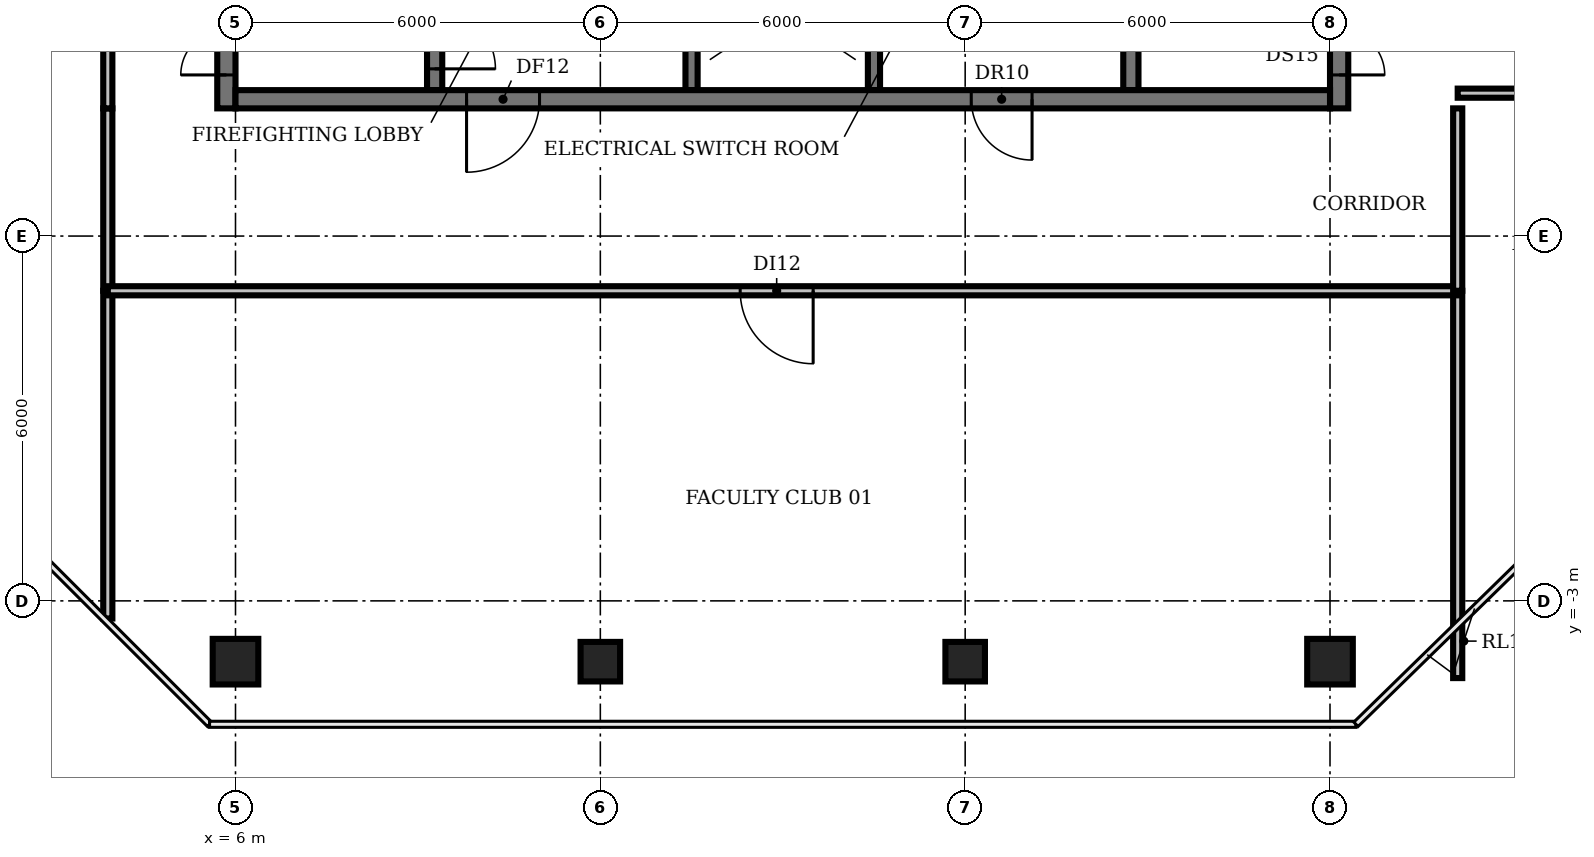
"""IFC4 building model, lengths in metres.
Left out: names, types, materials, properties, quantities, classifications, styles, units other than length and angle.
Written with IfcOpenShell. Run it as: python <this file> out.ifc"""

import sys

from ifc_helpers import new_model, si_unit, direction, frame, frame_2d, origin, origin_2d, place, context, subcontext, project, spatial, rectangle, circle, extrude, element, fill, save


model = new_model("IFC4")
c1 = context("Model", 3, precision=1e-05, world=origin(), true_north=direction((0.0, 1.0)))
c2 = subcontext(c1, "Body", "Model", "MODEL_VIEW")
j1 = project(units=[si_unit("LENGTHUNIT", "METRE"), si_unit("PLANEANGLEUNIT", "RADIAN")], contexts=[c1])
p1 = place(None, origin())
s1 = spatial("IfcSite", under=j1, at=p1, CompositionType="ELEMENT")
p2 = place(p1, origin())
s2 = spatial("IfcBuilding", under=s1, at=p2, CompositionType="ELEMENT")
p3 = place(p2, frame((0.0, 0.0, 318.8)))
s3 = spatial("IfcBuildingStorey", under=s2, at=p3, CompositionType="ELEMENT", Elevation=318.8)
p4 = place(p3, frame((6.0, -4.0, 0.0), z_axis=(0.0, 0.0, 1.0), x_axis=(1.0, 0.0, 0.0)))
e1 = element("IfcColumn", 1, at=p4, inside=s3, PredefinedType="COLUMN", context=c2, shape_type="SweptSolid", body=[
    extrude(circle(Radius=0.375, at=origin_2d()), origin(), (0.0, 0.0, 1.0), 3.9),
])
for number, where, z_axis, x_axis in (
    (2, (12.0, -4.0, 0.0), (0.0, 0.0, 1.0), (1.0, 0.0, 0.0)),
    (3, (18.0, -4.0, 0.0), (0.0, 0.0, 1.0), (1.0, 0.0, 0.0)),
):
    element("IfcColumn", number, at=place(p3, frame(where, z_axis=z_axis, x_axis=x_axis)), inside=s3, PredefinedType="COLUMN", context=c2, shape_type="SweptSolid", body=[
        extrude(rectangle(XDim=0.65, YDim=0.65, at=origin_2d()), origin(), (0.0, 0.0, 1.0), 3.9),
    ])
p5 = place(p3, frame((24.0, -4.0, 0.0), z_axis=(0.0, 0.0, 1.0), x_axis=(1.0, 0.0, 0.0)))
e4 = element("IfcColumn", 4, at=p5, inside=s3, PredefinedType="COLUMN", context=c2, shape_type="SweptSolid", body=[
    extrude(circle(Radius=0.375, at=origin_2d()), origin(), (0.0, 0.0, 1.0), 3.9),
])
p6 = place(p3, frame((9.275, 11.825, 0.0), z_axis=(0.0, 0.0, 1.0), x_axis=(0.0, -1.0, 0.0)))
e5 = element("IfcWall", 5, at=p6, inside=s3, PredefinedType="SHEAR", context=c2, shape_type="SweptSolid", body=[
    extrude(rectangle(XDim=6.425, YDim=0.25, at=frame_2d((3.212, 0.0))), origin(), (0.0, 0.0, 1.0), 3.9),
])
p7 = place(p6, frame((5.075, 0.0, 0.0)))
e6 = element("IfcOpeningElement", 6, at=p7, cuts=e5, PredefinedType="OPENING", context=c2, shape_type="SweptSolid", body=[
    extrude(rectangle(XDim=1.0, YDim=2.1, at=frame_2d((0.5, 1.05))), frame((0.0, 0.135, 0.0), z_axis=(0.0, -1.0, 0.0), x_axis=(1.0, 0.0, 0.0)), (0.0, 0.0, 1.0), 0.27),
])
p8 = place(p3, frame((13.5, 5.4, 0.0), z_axis=(0.0, 0.0, 1.0), x_axis=(0.0, 1.0, 0.0)))
e7 = element("IfcWall", 7, at=p8, inside=s3, PredefinedType="SHEAR", context=c2, shape_type="SweptSolid", body=[
    extrude(rectangle(XDim=8.2, YDim=0.2, at=frame_2d((4.1, 0.0))), origin(), (0.0, 0.0, 1.0), 3.9),
])
p9 = place(p8, frame((0.75, 0.0, 0.0)))
e8 = element("IfcOpeningElement", 8, at=p9, cuts=e7, PredefinedType="OPENING", context=c2, shape_type="SweptSolid", body=[
    extrude(rectangle(XDim=1.1, YDim=2.1, at=frame_2d((0.55, 1.05))), frame((0.0, 0.11, 0.0), z_axis=(0.0, -1.0, 0.0), x_axis=(1.0, 0.0, 0.0)), (0.0, 0.0, 1.0), 0.22),
])
p10 = place(p8, frame((3.55, 0.0, 0.0)))
e9 = element("IfcOpeningElement", 9, at=p10, cuts=e7, PredefinedType="OPENING", context=c2, shape_type="SweptSolid", body=[
    extrude(rectangle(XDim=1.1, YDim=2.1, at=frame_2d((0.55, 1.05))), frame((0.0, 0.11, 0.0), z_axis=(0.0, -1.0, 0.0), x_axis=(1.0, 0.0, 0.0)), (0.0, 0.0, 1.0), 0.22),
])
p11 = place(p8, frame((6.35, 0.0, 0.0)))
e10 = element("IfcOpeningElement", 10, at=p11, cuts=e7, PredefinedType="OPENING", context=c2, shape_type="SweptSolid", body=[
    extrude(rectangle(XDim=1.1, YDim=2.1, at=frame_2d((0.55, 1.05))), frame((0.0, 0.11, 0.0), z_axis=(0.0, -1.0, 0.0), x_axis=(1.0, 0.0, 0.0)), (0.0, 0.0, 1.0), 0.22),
])
p12 = place(p3, frame((16.5, 5.4, 0.0), z_axis=(0.0, 0.0, 1.0), x_axis=(0.0, 1.0, 0.0)))
e11 = element("IfcWall", 11, at=p12, inside=s3, PredefinedType="SHEAR", context=c2, shape_type="SweptSolid", body=[
    extrude(rectangle(XDim=8.2, YDim=0.2, at=frame_2d((4.1, 0.0))), origin(), (0.0, 0.0, 1.0), 3.9),
])
p13 = place(p3, frame((20.725, 5.4, 0.0), z_axis=(0.0, 0.0, 1.0), x_axis=(0.0, 1.0, 0.0)))
e12 = element("IfcWall", 12, at=p13, inside=s3, PredefinedType="SHEAR", context=c2, shape_type="SweptSolid", body=[
    extrude(rectangle(XDim=8.2, YDim=0.25, at=frame_2d((4.1, 0.0))), origin(), (0.0, 0.0, 1.0), 3.9),
])
p14 = place(p3, frame((5.85, 5.1, 0.0), z_axis=(0.0, 0.0, 1.0), x_axis=(0.0, 1.0, 0.0)))
e13 = element("IfcWall", 13, at=p14, inside=s3, PredefinedType="SHEAR", context=c2, shape_type="SweptSolid", body=[
    extrude(rectangle(XDim=20.0, YDim=0.3, at=frame_2d((10.0, 0.0))), origin(), (0.0, 0.0, 1.0), 3.9),
])
p15 = place(p14, frame((0.55, 0.0, 0.0)))
e14 = element("IfcOpeningElement", 14, at=p15, cuts=e13, PredefinedType="OPENING", context=c2, shape_type="SweptSolid", body=[
    extrude(rectangle(XDim=1.5, YDim=2.1, at=frame_2d((0.75, 1.05))), frame((0.0, 0.16, 0.0), z_axis=(0.0, -1.0, 0.0), x_axis=(1.0, 0.0, 0.0)), (0.0, 0.0, 1.0), 0.32),
])
p16 = place(p14, frame((7.0, 0.0, 0.0)))
e15 = element("IfcOpeningElement", 15, at=p16, cuts=e13, PredefinedType="OPENING", context=c2, shape_type="SweptSolid", body=[
    extrude(rectangle(XDim=1.2, YDim=2.1, at=frame_2d((0.6, 1.05))), frame((0.0, 0.16, 0.0), z_axis=(0.0, -1.0, 0.0), x_axis=(1.0, 0.0, 0.0)), (0.0, 0.0, 1.0), 0.32),
])
p17 = place(p14, frame((13.55, 0.0, 0.0)))
e16 = element("IfcOpeningElement", 16, at=p17, cuts=e13, PredefinedType="OPENING", context=c2, shape_type="SweptSolid", body=[
    extrude(rectangle(XDim=1.2, YDim=2.1, at=frame_2d((0.6, 1.05))), frame((0.0, 0.16, 0.0), z_axis=(0.0, -1.0, 0.0), x_axis=(1.0, 0.0, 0.0)), (0.0, 0.0, 1.0), 0.32),
])
p18 = place(p3, frame((24.15, 25.705, 0.0), z_axis=(0.0, 0.0, 1.0), x_axis=(0.0, -1.0, 0.0)))
e17 = element("IfcWall", 17, at=p18, inside=s3, PredefinedType="SHEAR", context=c2, shape_type="SweptSolid", body=[
    extrude(rectangle(XDim=20.605, YDim=0.3, at=frame_2d((10.302, 0.0))), origin(), (0.0, 0.0, 1.0), 3.9),
])
p19 = place(p18, frame((18.555, 0.0, 0.0)))
e18 = element("IfcOpeningElement", 18, at=p19, cuts=e17, PredefinedType="OPENING", context=c2, shape_type="SweptSolid", body=[
    extrude(rectangle(XDim=1.5, YDim=2.1, at=frame_2d((0.75, 1.05))), frame((0.0, 0.16, 0.0), z_axis=(0.0, -1.0, 0.0), x_axis=(1.0, 0.0, 0.0)), (0.0, 0.0, 1.0), 0.32),
])
p20 = place(p18, frame((12.455, 0.0, 0.0)))
e19 = element("IfcOpeningElement", 19, at=p20, cuts=e17, PredefinedType="OPENING", context=c2, shape_type="SweptSolid", body=[
    extrude(rectangle(XDim=0.9, YDim=2.1, at=frame_2d((0.45, 1.05))), frame((0.0, 0.16, 0.0), z_axis=(0.0, -1.0, 0.0), x_axis=(1.0, 0.0, 0.0)), (0.0, 0.0, 1.0), 0.32),
])
p21 = place(p18, frame((6.455, 0.0, 0.0)))
e20 = element("IfcOpeningElement", 20, at=p21, cuts=e17, PredefinedType="OPENING", context=c2, shape_type="SweptSolid", body=[
    extrude(rectangle(XDim=2.0, YDim=2.1, at=frame_2d((1.0, 1.05))), frame((0.0, 0.16, 0.0), z_axis=(0.0, -1.0, 0.0), x_axis=(1.0, 0.0, 0.0)), (0.0, 0.0, 1.0), 0.32),
])
p22 = place(p3, frame((24.0, 5.25, 0.0), z_axis=(0.0, 0.0, 1.0), x_axis=(-1.0, 0.0, 0.0)))
e21 = element("IfcWall", 21, at=p22, inside=s3, PredefinedType="SHEAR", context=c2, shape_type="SweptSolid", body=[
    extrude(rectangle(XDim=18.0, YDim=0.3, at=frame_2d((9.0, 0.0))), origin(), (0.0, 0.0, 1.0), 3.9),
])
p23 = place(p22, frame((13.0, 0.0, 0.0)))
e22 = element("IfcOpeningElement", 22, at=p23, cuts=e21, PredefinedType="OPENING", context=c2, shape_type="SweptSolid", body=[
    extrude(rectangle(XDim=1.2, YDim=2.1, at=frame_2d((0.6, 1.05))), frame((0.0, 0.16, 0.0), z_axis=(0.0, -1.0, 0.0), x_axis=(1.0, 0.0, 0.0)), (0.0, 0.0, 1.0), 0.32),
])
p24 = place(p22, frame((4.9, 0.0, 0.0)))
e23 = element("IfcOpeningElement", 23, at=p24, cuts=e21, PredefinedType="OPENING", context=c2, shape_type="SweptSolid", body=[
    extrude(rectangle(XDim=1.0, YDim=2.1, at=frame_2d((0.5, 1.05))), frame((0.0, 0.16, 0.0), z_axis=(0.0, -1.0, 0.0), x_axis=(1.0, 0.0, 0.0)), (0.0, 0.0, 1.0), 0.32),
])
p25 = place(p3, frame((3.9, -3.29, 0.0), z_axis=(0.0, 0.0, 1.0), x_axis=(0.0, 1.0, 0.0)))
e24 = element("IfcWall", 24, at=p25, inside=s3, PredefinedType="PARTITIONING", context=c2, shape_type="SweptSolid", body=[
    extrude(rectangle(XDim=5.39, YDim=0.15, at=frame_2d((2.695, 0.0))), origin(), (0.0, 0.0, 1.0), 2.95),
])
p26 = place(p3, frame((3.9, 2.1, 0.0), z_axis=(0.0, 0.0, 1.0), x_axis=(0.0, 1.0, 0.0)))
e25 = element("IfcWall", 25, at=p26, inside=s3, PredefinedType="PARTITIONING", context=c2, shape_type="SweptSolid", body=[
    extrude(rectangle(XDim=3.0, YDim=0.15, at=frame_2d((1.5, 0.0))), origin(), (0.0, 0.0, 1.0), 2.95),
])
p27 = place(p3, frame((3.9, 5.1, 0.0), z_axis=(0.0, 0.0, 1.0), x_axis=(0.0, 1.0, 0.0)))
e26 = element("IfcWall", 26, at=p27, inside=s3, PredefinedType="PARTITIONING", context=c2, shape_type="SweptSolid", body=[
    extrude(rectangle(XDim=13.9, YDim=0.15, at=frame_2d((6.95, 0.0))), origin(), (0.0, 0.0, 1.0), 2.95),
])
p28 = place(p27, frame((6.2, 0.0, 0.0)))
e27 = element("IfcOpeningElement", 27, at=p28, cuts=e26, PredefinedType="OPENING", context=c2, shape_type="SweptSolid", body=[
    extrude(rectangle(XDim=1.2, YDim=2.1, at=frame_2d((0.6, 1.05))), frame((0.0, 0.085, 0.0), z_axis=(0.0, -1.0, 0.0), x_axis=(1.0, 0.0, 0.0)), (0.0, 0.0, 1.0), 0.17),
])
p29 = place(p3, frame((26.1, -4.27, 0.0), z_axis=(0.0, 0.0, 1.0), x_axis=(0.0, 1.0, 0.0)))
e28 = element("IfcWall", 28, at=p29, inside=s3, PredefinedType="PARTITIONING", context=c2, shape_type="SweptSolid", body=[
    extrude(rectangle(XDim=6.37, YDim=0.15, at=frame_2d((3.185, 0.0))), origin(), (0.0, 0.0, 1.0), 2.95),
])
p30 = place(p3, frame((26.1, 2.1, 0.0), z_axis=(0.0, 0.0, 1.0), x_axis=(-1.0, 0.0, 0.0)))
e29 = element("IfcWall", 29, at=p30, inside=s3, PredefinedType="PARTITIONING", context=c2, shape_type="SweptSolid", body=[
    extrude(rectangle(XDim=22.2, YDim=0.15, at=frame_2d((11.1, 0.0))), origin(), (0.0, 0.0, 1.0), 2.95),
])
p31 = place(p30, frame((10.6, 0.0, 0.0)))
e30 = element("IfcOpeningElement", 30, at=p31, cuts=e29, PredefinedType="OPENING", context=c2, shape_type="SweptSolid", body=[
    extrude(rectangle(XDim=1.2, YDim=2.1, at=frame_2d((0.6, 1.05))), frame((0.0, 0.085, 0.0), z_axis=(0.0, -1.0, 0.0), x_axis=(1.0, 0.0, 0.0)), (0.0, 0.0, 1.0), 0.17),
])
p32 = place(p3, frame((26.1, 2.1, 0.0), z_axis=(0.0, 0.0, 1.0), x_axis=(0.0, 1.0, 0.0)))
e31 = element("IfcWall", 31, at=p32, inside=s3, PredefinedType="PARTITIONING", context=c2, shape_type="SweptSolid", body=[
    extrude(rectangle(XDim=3.0, YDim=0.15, at=frame_2d((1.5, 0.0))), origin(), (0.0, 0.0, 1.0), 2.95),
])
p33 = place(p3, frame((32.07, 5.35, 0.0), z_axis=(0.0, 0.0, 1.0), x_axis=(-1.0, 0.0, 0.0)))
e32 = element("IfcWall", 32, at=p33, inside=s3, PredefinedType="PARTITIONING", context=c2, shape_type="SweptSolid", body=[
    extrude(rectangle(XDim=5.97, YDim=0.15, at=frame_2d((2.985, 0.0))), origin(), (0.0, 0.0, 1.0), 2.95),
])
p34 = place(p33, frame((3.27, 0.0, 0.0)))
e33 = element("IfcOpeningElement", 33, at=p34, cuts=e32, PredefinedType="OPENING", context=c2, shape_type="SweptSolid", body=[
    extrude(rectangle(XDim=1.0, YDim=2.1, at=frame_2d((0.5, 1.05))), frame((0.0, 0.085, 0.0), z_axis=(0.0, -1.0, 0.0), x_axis=(1.0, 0.0, 0.0)), (0.0, 0.0, 1.0), 0.17),
])
p35 = place(p7, origin())
e34 = element("IfcDoor", 34, at=p35, inside=s3, OperationType="SINGLE_SWING_RIGHT", PredefinedType="DOOR", context=c2, shape_type="SweptSolid", body=[
    extrude(rectangle(XDim=1.0, YDim=2.1, at=frame_2d((0.5, 1.05))), frame((0.0, 0.025, 0.0), z_axis=(0.0, -1.0, 0.0), x_axis=(1.0, 0.0, 0.0)), (0.0, 0.0, 1.0), 0.05),
])
fill(e6, e34)
p36 = place(p15, origin())
e35 = element("IfcDoor", 35, at=p36, inside=s3, OperationType="DOUBLE_DOOR_SINGLE_SWING", PredefinedType="DOOR", context=c2, shape_type="SweptSolid", body=[
    extrude(rectangle(XDim=1.5, YDim=2.1, at=frame_2d((0.75, 1.05))), frame((0.0, 0.025, 0.0), z_axis=(0.0, -1.0, 0.0), x_axis=(1.0, 0.0, 0.0)), (0.0, 0.0, 1.0), 0.05),
])
fill(e14, e35)
p37 = place(p19, origin())
e36 = element("IfcDoor", 36, at=p37, inside=s3, OperationType="DOUBLE_DOOR_SINGLE_SWING", PredefinedType="DOOR", context=c2, shape_type="SweptSolid", body=[
    extrude(rectangle(XDim=1.5, YDim=2.1, at=frame_2d((0.75, 1.05))), frame((0.0, 0.025, 0.0), z_axis=(0.0, -1.0, 0.0), x_axis=(1.0, 0.0, 0.0)), (0.0, 0.0, 1.0), 0.05),
])
fill(e18, e36)
p38 = place(p23, origin())
e37 = element("IfcDoor", 37, at=p38, inside=s3, OperationType="SINGLE_SWING_RIGHT", PredefinedType="DOOR", context=c2, shape_type="SweptSolid", body=[
    extrude(rectangle(XDim=1.2, YDim=2.1, at=frame_2d((0.6, 1.05))), frame((0.0, 0.025, 0.0), z_axis=(0.0, -1.0, 0.0), x_axis=(1.0, 0.0, 0.0)), (0.0, 0.0, 1.0), 0.05),
])
fill(e22, e37)
p39 = place(p24, origin())
e38 = element("IfcDoor", 38, at=p39, inside=s3, OperationType="SINGLE_SWING_LEFT", PredefinedType="DOOR", context=c2, shape_type="SweptSolid", body=[
    extrude(rectangle(XDim=1.0, YDim=2.1, at=frame_2d((0.5, 1.05))), frame((0.0, 0.025, 0.0), z_axis=(0.0, -1.0, 0.0), x_axis=(1.0, 0.0, 0.0)), (0.0, 0.0, 1.0), 0.05),
])
fill(e23, e38)
p40 = place(p31, origin())
e39 = element("IfcDoor", 39, at=p40, inside=s3, OperationType="SINGLE_SWING_LEFT", PredefinedType="DOOR", context=c2, shape_type="SweptSolid", body=[
    extrude(rectangle(XDim=1.2, YDim=2.1, at=frame_2d((0.6, 1.05))), frame((0.0, 0.025, 0.0), z_axis=(0.0, -1.0, 0.0), x_axis=(1.0, 0.0, 0.0)), (0.0, 0.0, 1.0), 0.05),
])
fill(e30, e39)
save(model, sys.argv[1])
